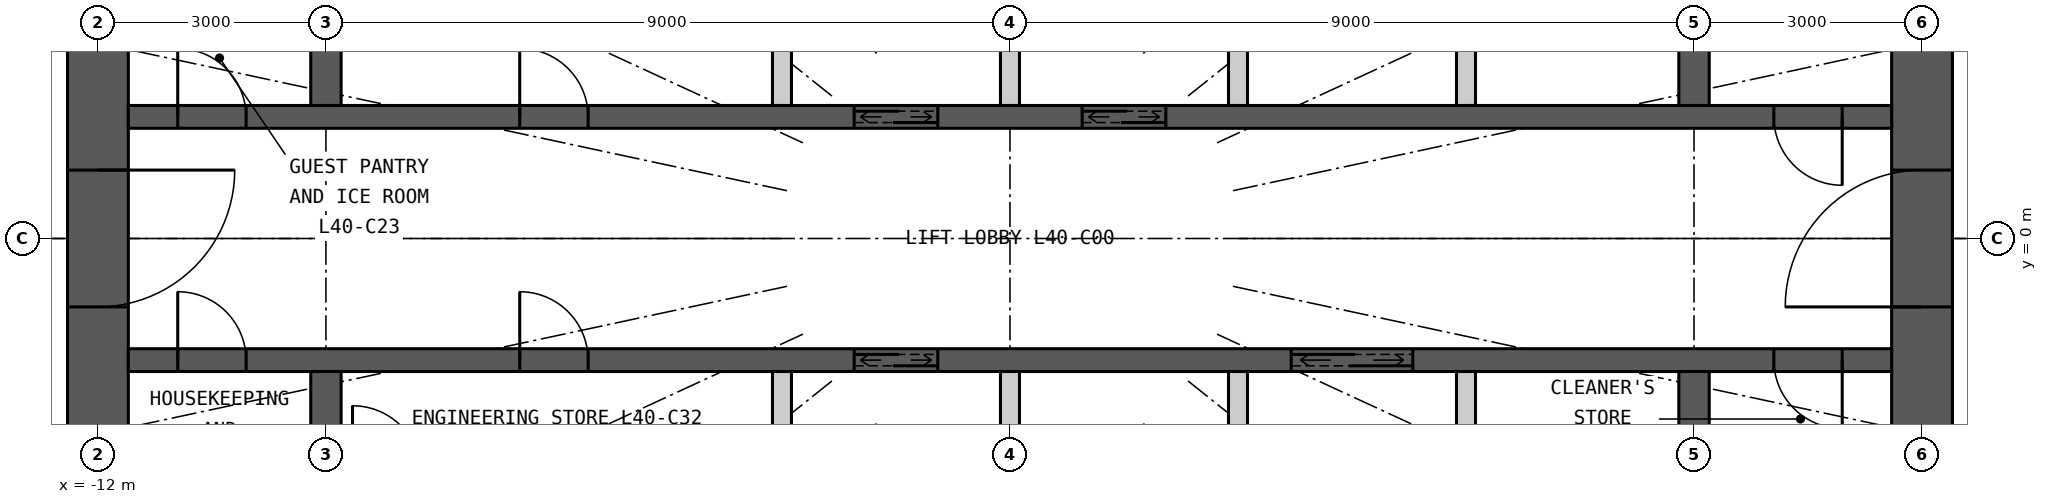
"""IFC4 building model, lengths in metres.
Left out: names, types, materials, properties, quantities, classifications, styles, units other than length and angle.
Written with IfcOpenShell. Run it as: python <this file> out.ifc"""

import sys

from ifc_helpers import new_model, si_unit, direction, frame, frame_2d, origin, place, context, subcontext, project, spatial, rectangle, extrude, element, fill, save


model = new_model("IFC4")
c1 = context("Model", 3, precision=1e-05, world=origin(), true_north=direction((0.0, 1.0)))
c2 = subcontext(c1, "Body", "Model", "MODEL_VIEW")
j1 = project(units=[si_unit("LENGTHUNIT", "METRE"), si_unit("PLANEANGLEUNIT", "RADIAN")], contexts=[c1])
p1 = place(None, origin())
s1 = spatial("IfcSite", under=j1, at=p1, CompositionType="ELEMENT")
p2 = place(p1, origin())
s2 = spatial("IfcBuilding", under=s1, at=p2, CompositionType="ELEMENT")
p3 = place(p2, frame((0.0, 0.0, 153.3)))
s3 = spatial("IfcBuildingStorey", under=s2, at=p3, CompositionType="ELEMENT", Elevation=153.3)
p4 = place(p3, frame((12.0, -7.6, 0.0), z_axis=(0.0, 0.0, 1.0), x_axis=(0.0, 1.0, 0.0)))
e1 = element("IfcWall", 1, at=p4, inside=s3, PredefinedType="SHEAR", context=c2, shape_type="SweptSolid", body=[
    extrude(rectangle(XDim=15.2, YDim=0.8, at=frame_2d((7.6, 0.0))), origin(), (0.0, 0.0, 1.0), 3.3),
])
p5 = place(p4, frame((6.7, 0.0, 0.0)))
e2 = element("IfcOpeningElement", 2, at=p5, cuts=e1, PredefinedType="OPENING", context=c2, shape_type="SweptSolid", body=[
    extrude(rectangle(XDim=1.8, YDim=2.2, at=frame_2d((0.9, 1.1))), frame((0.0, 0.41, 0.0), z_axis=(0.0, -1.0, 0.0), x_axis=(1.0, 0.0, 0.0)), (0.0, 0.0, 1.0), 0.82),
])
p6 = place(p3, frame((-12.0, 7.6, 0.0), z_axis=(0.0, 0.0, 1.0), x_axis=(0.0, -1.0, 0.0)))
e3 = element("IfcWall", 3, at=p6, inside=s3, PredefinedType="SHEAR", context=c2, shape_type="SweptSolid", body=[
    extrude(rectangle(XDim=15.2, YDim=0.8, at=frame_2d((7.6, 0.0))), origin(), (0.0, 0.0, 1.0), 3.3),
])
p7 = place(p6, frame((6.7, 0.0, 0.0)))
e4 = element("IfcOpeningElement", 4, at=p7, cuts=e3, PredefinedType="OPENING", context=c2, shape_type="SweptSolid", body=[
    extrude(rectangle(XDim=1.8, YDim=2.2, at=frame_2d((0.9, 1.1))), frame((0.0, 0.41, 0.0), z_axis=(0.0, -1.0, 0.0), x_axis=(1.0, 0.0, 0.0)), (0.0, 0.0, 1.0), 0.82),
])
p8 = place(p3, frame((-11.6, 1.6, 0.0), z_axis=(0.0, 0.0, 1.0), x_axis=(1.0, 0.0, 0.0)))
e5 = element("IfcWall", 5, at=p8, inside=s3, PredefinedType="SHEAR", context=c2, shape_type="SweptSolid", body=[
    extrude(rectangle(XDim=23.2, YDim=0.3, at=frame_2d((11.6, 0.0))), origin(), (0.0, 0.0, 1.0), 3.3),
])
p9 = place(p8, frame((9.55, 0.0, 0.0)))
e6 = element("IfcOpeningElement", 6, at=p9, cuts=e5, PredefinedType="OPENING", context=c2, shape_type="SweptSolid", body=[
    extrude(rectangle(XDim=1.1, YDim=2.2, at=frame_2d((0.55, 1.1))), frame((0.0, 0.16, 0.0), z_axis=(0.0, -1.0, 0.0), x_axis=(1.0, 0.0, 0.0)), (0.0, 0.0, 1.0), 0.32),
])
p10 = place(p8, frame((12.55, 0.0, 0.0)))
e7 = element("IfcOpeningElement", 7, at=p10, cuts=e5, PredefinedType="OPENING", context=c2, shape_type="SweptSolid", body=[
    extrude(rectangle(XDim=1.1, YDim=2.2, at=frame_2d((0.55, 1.1))), frame((0.0, 0.16, 0.0), z_axis=(0.0, -1.0, 0.0), x_axis=(1.0, 0.0, 0.0)), (0.0, 0.0, 1.0), 0.32),
])
p11 = place(p8, frame((5.15, 0.0, 0.0)))
e8 = element("IfcOpeningElement", 8, at=p11, cuts=e5, PredefinedType="OPENING", context=c2, shape_type="SweptSolid", body=[
    extrude(rectangle(XDim=0.9, YDim=2.2, at=frame_2d((0.45, 1.1))), frame((0.0, 0.16, 0.0), z_axis=(0.0, -1.0, 0.0), x_axis=(1.0, 0.0, 0.0)), (0.0, 0.0, 1.0), 0.32),
])
p12 = place(p8, frame((21.65, 0.0, 0.0)))
e9 = element("IfcOpeningElement", 9, at=p12, cuts=e5, PredefinedType="OPENING", context=c2, shape_type="SweptSolid", body=[
    extrude(rectangle(XDim=0.9, YDim=2.2, at=frame_2d((0.45, 1.1))), frame((0.0, 0.16, 0.0), z_axis=(0.0, -1.0, 0.0), x_axis=(1.0, 0.0, 0.0)), (0.0, 0.0, 1.0), 0.32),
])
p13 = place(p8, frame((0.65, 0.0, 0.0)))
e10 = element("IfcOpeningElement", 10, at=p13, cuts=e5, PredefinedType="OPENING", context=c2, shape_type="SweptSolid", body=[
    extrude(rectangle(XDim=0.9, YDim=2.2, at=frame_2d((0.45, 1.1))), frame((0.0, 0.16, 0.0), z_axis=(0.0, -1.0, 0.0), x_axis=(1.0, 0.0, 0.0)), (0.0, 0.0, 1.0), 0.32),
])
p14 = place(p3, frame((-11.6, -1.6, 0.0), z_axis=(0.0, 0.0, 1.0), x_axis=(1.0, 0.0, 0.0)))
e11 = element("IfcWall", 11, at=p14, inside=s3, PredefinedType="SHEAR", context=c2, shape_type="SweptSolid", body=[
    extrude(rectangle(XDim=23.2, YDim=0.3, at=frame_2d((11.6, 0.0))), origin(), (0.0, 0.0, 1.0), 3.3),
])
p15 = place(p14, frame((9.55, 0.0, 0.0)))
e12 = element("IfcOpeningElement", 12, at=p15, cuts=e11, PredefinedType="OPENING", context=c2, shape_type="SweptSolid", body=[
    extrude(rectangle(XDim=1.1, YDim=2.2, at=frame_2d((0.55, 1.1))), frame((0.0, 0.16, 0.0), z_axis=(0.0, -1.0, 0.0), x_axis=(1.0, 0.0, 0.0)), (0.0, 0.0, 1.0), 0.32),
])
p16 = place(p14, frame((15.3, 0.0, 0.0)))
e13 = element("IfcOpeningElement", 13, at=p16, cuts=e11, PredefinedType="OPENING", context=c2, shape_type="SweptSolid", body=[
    extrude(rectangle(XDim=1.6, YDim=2.4, at=frame_2d((0.8, 1.2))), frame((0.0, 0.16, 0.0), z_axis=(0.0, -1.0, 0.0), x_axis=(1.0, 0.0, 0.0)), (0.0, 0.0, 1.0), 0.32),
])
p17 = place(p14, frame((0.65, 0.0, 0.0)))
e14 = element("IfcOpeningElement", 14, at=p17, cuts=e11, PredefinedType="OPENING", context=c2, shape_type="SweptSolid", body=[
    extrude(rectangle(XDim=0.9, YDim=2.2, at=frame_2d((0.45, 1.1))), frame((0.0, 0.16, 0.0), z_axis=(0.0, -1.0, 0.0), x_axis=(1.0, 0.0, 0.0)), (0.0, 0.0, 1.0), 0.32),
])
p18 = place(p14, frame((5.15, 0.0, 0.0)))
e15 = element("IfcOpeningElement", 15, at=p18, cuts=e11, PredefinedType="OPENING", context=c2, shape_type="SweptSolid", body=[
    extrude(rectangle(XDim=0.9, YDim=2.2, at=frame_2d((0.45, 1.1))), frame((0.0, 0.16, 0.0), z_axis=(0.0, -1.0, 0.0), x_axis=(1.0, 0.0, 0.0)), (0.0, 0.0, 1.0), 0.32),
])
p19 = place(p14, frame((21.65, 0.0, 0.0)))
e16 = element("IfcOpeningElement", 16, at=p19, cuts=e11, PredefinedType="OPENING", context=c2, shape_type="SweptSolid", body=[
    extrude(rectangle(XDim=0.9, YDim=2.2, at=frame_2d((0.45, 1.1))), frame((0.0, 0.16, 0.0), z_axis=(0.0, -1.0, 0.0), x_axis=(1.0, 0.0, 0.0)), (0.0, 0.0, 1.0), 0.32),
])
for number, where, z_axis, x_axis in (
    (17, (-9.0, 1.75, 0.0), (0.0, 0.0, 1.0), (0.0, 1.0, 0.0)),
    (18, (-9.0, -4.1, 0.0), (0.0, 0.0, 1.0), (0.0, 1.0, 0.0)),
    (19, (9.0, 1.75, 0.0), (0.0, 0.0, 1.0), (0.0, 1.0, 0.0)),
    (20, (9.0, -4.1, 0.0), (0.0, 0.0, 1.0), (0.0, 1.0, 0.0)),
):
    element("IfcWall", number, at=place(p3, frame(where, z_axis=z_axis, x_axis=x_axis)), inside=s3, PredefinedType="SHEAR", context=c2, shape_type="SweptSolid", body=[
        extrude(rectangle(XDim=2.35, YDim=0.4, at=frame_2d((1.175, 0.0))), origin(), (0.0, 0.0, 1.0), 3.3),
    ])
for number, where, z_axis, x_axis in (
    (21, (-3.0, 1.75, 0.0), (0.0, 0.0, 1.0), (0.0, 1.0, 0.0)),
    (22, (0.0, 1.75, 0.0), (0.0, 0.0, 1.0), (0.0, 1.0, 0.0)),
    (23, (3.0, 1.75, 0.0), (0.0, 0.0, 1.0), (0.0, 1.0, 0.0)),
    (24, (6.0, 1.75, 0.0), (0.0, 0.0, 1.0), (0.0, 1.0, 0.0)),
    (25, (-3.0, -4.1, 0.0), (0.0, 0.0, 1.0), (0.0, 1.0, 0.0)),
    (26, (0.0, -4.1, 0.0), (0.0, 0.0, 1.0), (0.0, 1.0, 0.0)),
    (27, (3.0, -4.1, 0.0), (0.0, 0.0, 1.0), (0.0, 1.0, 0.0)),
    (28, (6.0, -4.1, 0.0), (0.0, 0.0, 1.0), (0.0, 1.0, 0.0)),
):
    element("IfcWall", number, at=place(p3, frame(where, z_axis=z_axis, x_axis=x_axis)), inside=s3, PredefinedType="PARTITIONING", context=c2, shape_type="SweptSolid", body=[
        extrude(rectangle(XDim=2.35, YDim=0.25, at=frame_2d((1.175, 0.0))), origin(), (0.0, 0.0, 1.0), 3.3),
    ])
p20 = place(p9, origin())
e29 = element("IfcDoor", 29, at=p20, inside=s3, OperationType="DOUBLE_DOOR_SLIDING", PredefinedType="DOOR", context=c2, shape_type="SweptSolid", body=[
    extrude(rectangle(XDim=1.1, YDim=2.2, at=frame_2d((0.55, 1.1))), frame((0.0, 0.025, 0.0), z_axis=(0.0, -1.0, 0.0), x_axis=(1.0, 0.0, 0.0)), (0.0, 0.0, 1.0), 0.05),
])
fill(e6, e29)
p21 = place(p10, origin())
e30 = element("IfcDoor", 30, at=p21, inside=s3, OperationType="DOUBLE_DOOR_SLIDING", PredefinedType="DOOR", context=c2, shape_type="SweptSolid", body=[
    extrude(rectangle(XDim=1.1, YDim=2.2, at=frame_2d((0.55, 1.1))), frame((0.0, 0.025, 0.0), z_axis=(0.0, -1.0, 0.0), x_axis=(1.0, 0.0, 0.0)), (0.0, 0.0, 1.0), 0.05),
])
fill(e7, e30)
p22 = place(p15, origin())
e31 = element("IfcDoor", 31, at=p22, inside=s3, OperationType="DOUBLE_DOOR_SLIDING", PredefinedType="DOOR", context=c2, shape_type="SweptSolid", body=[
    extrude(rectangle(XDim=1.1, YDim=2.2, at=frame_2d((0.55, 1.1))), frame((0.0, 0.025, 0.0), z_axis=(0.0, -1.0, 0.0), x_axis=(1.0, 0.0, 0.0)), (0.0, 0.0, 1.0), 0.05),
])
fill(e12, e31)
p23 = place(p16, origin())
e32 = element("IfcDoor", 32, at=p23, inside=s3, OperationType="DOUBLE_DOOR_SLIDING", PredefinedType="DOOR", context=c2, shape_type="SweptSolid", body=[
    extrude(rectangle(XDim=1.6, YDim=2.4, at=frame_2d((0.8, 1.2))), frame((0.0, 0.025, 0.0), z_axis=(0.0, -1.0, 0.0), x_axis=(1.0, 0.0, 0.0)), (0.0, 0.0, 1.0), 0.05),
])
fill(e13, e32)
p24 = place(p11, origin())
e33 = element("IfcDoor", 33, at=p24, inside=s3, OperationType="SINGLE_SWING_LEFT", PredefinedType="DOOR", context=c2, shape_type="SweptSolid", body=[
    extrude(rectangle(XDim=0.9, YDim=2.2, at=frame_2d((0.45, 1.1))), frame((0.0, 0.025, 0.0), z_axis=(0.0, -1.0, 0.0), x_axis=(1.0, 0.0, 0.0)), (0.0, 0.0, 1.0), 0.05),
])
fill(e8, e33)
p25 = place(p12, origin())
e34 = element("IfcDoor", 34, at=p25, inside=s3, OperationType="SINGLE_SWING_RIGHT", PredefinedType="DOOR", context=c2, shape_type="SweptSolid", body=[
    extrude(rectangle(XDim=0.9, YDim=2.2, at=frame_2d((0.45, 1.1))), frame((0.0, 0.025, 0.0), z_axis=(0.0, -1.0, 0.0), x_axis=(1.0, 0.0, 0.0)), (0.0, 0.0, 1.0), 0.05),
])
fill(e9, e34)
p26 = place(p17, origin())
e35 = element("IfcDoor", 35, at=p26, inside=s3, OperationType="SINGLE_SWING_LEFT", PredefinedType="DOOR", context=c2, shape_type="SweptSolid", body=[
    extrude(rectangle(XDim=0.9, YDim=2.2, at=frame_2d((0.45, 1.1))), frame((0.0, 0.025, 0.0), z_axis=(0.0, -1.0, 0.0), x_axis=(1.0, 0.0, 0.0)), (0.0, 0.0, 1.0), 0.05),
])
fill(e14, e35)
p27 = place(p18, origin())
e36 = element("IfcDoor", 36, at=p27, inside=s3, OperationType="SINGLE_SWING_LEFT", PredefinedType="DOOR", context=c2, shape_type="SweptSolid", body=[
    extrude(rectangle(XDim=0.9, YDim=2.2, at=frame_2d((0.45, 1.1))), frame((0.0, 0.025, 0.0), z_axis=(0.0, -1.0, 0.0), x_axis=(1.0, 0.0, 0.0)), (0.0, 0.0, 1.0), 0.05),
])
fill(e15, e36)
p28 = place(p19, origin())
e37 = element("IfcDoor", 37, at=p28, inside=s3, OperationType="SINGLE_SWING_RIGHT", PredefinedType="DOOR", context=c2, shape_type="SweptSolid", body=[
    extrude(rectangle(XDim=0.9, YDim=2.2, at=frame_2d((0.45, 1.1))), frame((0.0, 0.025, 0.0), z_axis=(0.0, -1.0, 0.0), x_axis=(1.0, 0.0, 0.0)), (0.0, 0.0, 1.0), 0.05),
])
fill(e16, e37)
p29 = place(p13, origin())
e38 = element("IfcDoor", 38, at=p29, inside=s3, OperationType="SINGLE_SWING_LEFT", PredefinedType="DOOR", context=c2, shape_type="SweptSolid", body=[
    extrude(rectangle(XDim=0.9, YDim=2.2, at=frame_2d((0.45, 1.1))), frame((0.0, 0.025, 0.0), z_axis=(0.0, -1.0, 0.0), x_axis=(1.0, 0.0, 0.0)), (0.0, 0.0, 1.0), 0.05),
])
fill(e10, e38)
p30 = place(p5, origin())
e39 = element("IfcDoor", 39, at=p30, inside=s3, OperationType="DOUBLE_DOOR_DOUBLE_SWING", PredefinedType="DOOR", context=c2, shape_type="SweptSolid", body=[
    extrude(rectangle(XDim=1.8, YDim=2.2, at=frame_2d((0.9, 1.1))), frame((0.0, 0.025, 0.0), z_axis=(0.0, -1.0, 0.0), x_axis=(1.0, 0.0, 0.0)), (0.0, 0.0, 1.0), 0.05),
])
fill(e2, e39)
p31 = place(p7, origin())
e40 = element("IfcDoor", 40, at=p31, inside=s3, OperationType="DOUBLE_DOOR_DOUBLE_SWING", PredefinedType="DOOR", context=c2, shape_type="SweptSolid", body=[
    extrude(rectangle(XDim=1.8, YDim=2.2, at=frame_2d((0.9, 1.1))), frame((0.0, 0.025, 0.0), z_axis=(0.0, -1.0, 0.0), x_axis=(1.0, 0.0, 0.0)), (0.0, 0.0, 1.0), 0.05),
])
fill(e4, e40)
save(model, sys.argv[1])
